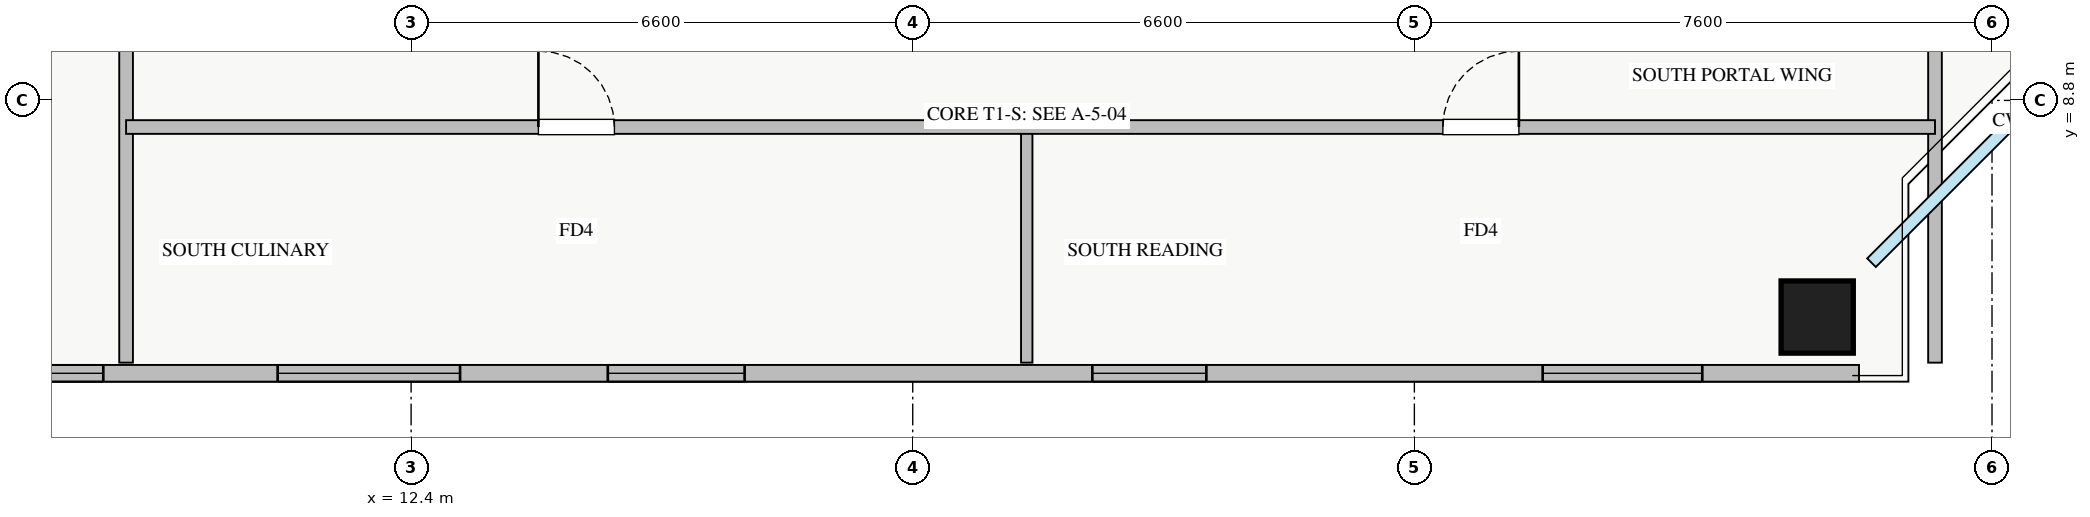
"""IFC4 building model, lengths in metres.
Left out: names, types, materials, properties, quantities, classifications, styles, units other than length and angle.
Written with IfcOpenShell. Run it as: python <this file> out.ifc"""

import sys

from ifc_helpers import new_model, si_unit, direction, frame, frame_2d, origin, origin_2d, place, context, subcontext, project, spatial, rectangle, extrude, source, transform, mapped, element, fill, save


model = new_model("IFC4")
c1 = context("Model", 3, precision=1e-05, world=origin(), true_north=direction((0.0, 1.0)))
c2 = subcontext(c1, "Body", "Model", "MODEL_VIEW")
j1 = project(units=[si_unit("LENGTHUNIT", "METRE"), si_unit("PLANEANGLEUNIT", "RADIAN")], contexts=[c1])
p1 = place(None, origin())
s1 = spatial("IfcSite", under=j1, at=p1, CompositionType="ELEMENT")
p2 = place(p1, origin())
s2 = spatial("IfcBuilding", under=s1, at=p2, CompositionType="ELEMENT")
p3 = place(p2, frame((0.0, 0.0, 163.25)))
s3 = spatial("IfcBuildingStorey", under=s2, at=p3, CompositionType="ELEMENT", Elevation=163.25)
m1 = source(origin(), c2, "Body", "SweptSolid", [
    extrude(rectangle(XDim=0.95, YDim=0.95, at=origin_2d()), origin(), (0.0, 0.0, 1.0), 3.25),
])
p4 = place(p3, frame((30.9, 5.95, 0.0), z_axis=(0.0, 0.0, 1.0), x_axis=(1.0, 0.0, 0.0)))
e1 = element("IfcColumn", 1, at=p4, inside=s3, PredefinedType="COLUMN", context=c2, shape_type="MappedRepresentation", body=[
    mapped(m1, transform((0.0, 0.0, 0.0), x_axis=(1.0, 0.0, 0.0), y_axis=(0.0, 1.0, 0.0), z_axis=(0.0, 0.0, 1.0), scale=1.0)),
])
p5 = place(p3, frame((6.55, 5.21, 0.0), z_axis=(0.0, 0.0, 1.0), x_axis=(1.0, 0.0, 0.0)))
e2 = element("IfcWall", 2, at=p5, inside=s3, PredefinedType="STANDARD", context=c2, shape_type="SweptSolid", body=[
    extrude(rectangle(XDim=24.9, YDim=0.22, at=frame_2d((12.45, 0.0))), origin(), (0.0, 0.0, 1.0), 2.61),
])
p6 = place(p5, frame((0.3, 0.0, 0.9)))
e3 = element("IfcOpeningElement", 3, at=p6, cuts=e2, PredefinedType="OPENING", context=c2, shape_type="SweptSolid", body=[
    extrude(rectangle(XDim=1.5, YDim=1.5, at=frame_2d((0.75, 0.75))), frame((0.0, 0.12, 0.0), z_axis=(0.0, -1.0, 0.0), x_axis=(1.0, 0.0, 0.0)), (0.0, 0.0, 1.0), 0.24),
])
p7 = place(p5, frame((8.438, 0.0, 0.9)))
e4 = element("IfcOpeningElement", 4, at=p7, cuts=e2, PredefinedType="OPENING", context=c2, shape_type="SweptSolid", body=[
    extrude(rectangle(XDim=1.8, YDim=1.45, at=frame_2d((0.9, 0.725))), frame((0.0, 0.12, 0.0), z_axis=(0.0, -1.0, 0.0), x_axis=(1.0, 0.0, 0.0)), (0.0, 0.0, 1.0), 0.24),
])
p8 = place(p5, frame((14.813, 0.0, 0.9)))
e5 = element("IfcOpeningElement", 5, at=p8, cuts=e2, PredefinedType="OPENING", context=c2, shape_type="SweptSolid", body=[
    extrude(rectangle(XDim=1.5, YDim=1.45, at=frame_2d((0.75, 0.725))), frame((0.0, 0.12, 0.0), z_axis=(0.0, -1.0, 0.0), x_axis=(1.0, 0.0, 0.0)), (0.0, 0.0, 1.0), 0.24),
])
p9 = place(p5, frame((20.738, 0.0, 0.9)))
e6 = element("IfcOpeningElement", 6, at=p9, cuts=e2, PredefinedType="OPENING", context=c2, shape_type="SweptSolid", body=[
    extrude(rectangle(XDim=2.1, YDim=1.48, at=frame_2d((1.05, 0.74))), frame((0.0, 0.12, 0.0), z_axis=(0.0, -1.0, 0.0), x_axis=(1.0, 0.0, 0.0)), (0.0, 0.0, 1.0), 0.24),
])
p10 = place(p5, frame((4.094, 0.0, 0.9)))
e7 = element("IfcOpeningElement", 7, at=p10, cuts=e2, PredefinedType="OPENING", context=c2, shape_type="SweptSolid", body=[
    extrude(rectangle(XDim=2.4, YDim=1.5, at=frame_2d((1.2, 0.75))), frame((0.0, 0.12, 0.0), z_axis=(0.0, -1.0, 0.0), x_axis=(1.0, 0.0, 0.0)), (0.0, 0.0, 1.0), 0.24),
])
p11 = place(p3, frame((8.65, 5.35, 0.0), z_axis=(0.0, 0.0, 1.0), x_axis=(0.0, 1.0, 0.0)))
e8 = element("IfcWall", 8, at=p11, inside=s3, PredefinedType="PARTITIONING", context=c2, shape_type="SweptSolid", body=[
    extrude(rectangle(XDim=11.35, YDim=0.18, at=frame_2d((5.675, 0.0))), origin(), (0.0, 0.0, 1.0), 3.07),
])
p12 = place(p11, frame((4.6, 0.0, 0.0)))
e9 = element("IfcOpeningElement", 9, at=p12, cuts=e8, PredefinedType="OPENING", context=c2, shape_type="SweptSolid", body=[
    extrude(rectangle(XDim=1.0, YDim=2.05, at=frame_2d((0.5, 1.025))), frame((0.0, 0.1, 0.0), z_axis=(0.0, -1.0, 0.0), x_axis=(1.0, 0.0, 0.0)), (0.0, 0.0, 1.0), 0.2),
])
p13 = place(p11, frame((8.8, 0.0, 0.0)))
e10 = element("IfcOpeningElement", 10, at=p13, cuts=e8, PredefinedType="OPENING", context=c2, shape_type="SweptSolid", body=[
    extrude(rectangle(XDim=1.0, YDim=2.05, at=frame_2d((0.5, 1.025))), frame((0.0, 0.1, 0.0), z_axis=(0.0, -1.0, 0.0), x_axis=(1.0, 0.0, 0.0)), (0.0, 0.0, 1.0), 0.2),
])
p14 = place(p3, frame((32.45, 5.35, 0.0), z_axis=(0.0, 0.0, 1.0), x_axis=(0.0, 1.0, 0.0)))
e11 = element("IfcWall", 11, at=p14, inside=s3, PredefinedType="PARTITIONING", context=c2, shape_type="SweptSolid", body=[
    extrude(rectangle(XDim=11.35, YDim=0.18, at=frame_2d((5.675, 0.0))), origin(), (0.0, 0.0, 1.0), 3.07),
])
p15 = place(p14, frame((4.6, 0.0, 0.0)))
e12 = element("IfcOpeningElement", 12, at=p15, cuts=e11, PredefinedType="OPENING", context=c2, shape_type="SweptSolid", body=[
    extrude(rectangle(XDim=1.0, YDim=2.05, at=frame_2d((0.5, 1.025))), frame((0.0, 0.1, 0.0), z_axis=(0.0, -1.0, 0.0), x_axis=(1.0, 0.0, 0.0)), (0.0, 0.0, 1.0), 0.2),
])
p16 = place(p14, frame((8.8, 0.0, 0.0)))
e13 = element("IfcOpeningElement", 13, at=p16, cuts=e11, PredefinedType="OPENING", context=c2, shape_type="SweptSolid", body=[
    extrude(rectangle(XDim=1.0, YDim=2.05, at=frame_2d((0.5, 1.025))), frame((0.0, 0.1, 0.0), z_axis=(0.0, -1.0, 0.0), x_axis=(1.0, 0.0, 0.0)), (0.0, 0.0, 1.0), 0.2),
])
p17 = place(p3, frame((20.5, 5.35, 0.0), z_axis=(0.0, 0.0, 1.0), x_axis=(0.0, 1.0, 0.0)))
e14 = element("IfcWall", 14, at=p17, inside=s3, PredefinedType="PARTITIONING", context=c2, shape_type="SweptSolid", body=[
    extrude(rectangle(XDim=3.1, YDim=0.15, at=frame_2d((1.55, 0.0))), origin(), (0.0, 0.0, 1.0), 3.07),
])
p18 = place(p3, frame((8.65, 8.45, 0.0), z_axis=(0.0, 0.0, 1.0), x_axis=(1.0, 0.0, 0.0)))
e15 = element("IfcWall", 15, at=p18, inside=s3, PredefinedType="PARTITIONING", context=c2, shape_type="SweptSolid", body=[
    extrude(rectangle(XDim=23.8, YDim=0.18, at=frame_2d((11.9, 0.0))), origin(), (0.0, 0.0, 1.0), 3.07),
])
p19 = place(p18, frame((5.425, 0.0, 0.0)))
e16 = element("IfcOpeningElement", 16, at=p19, cuts=e15, PredefinedType="OPENING", context=c2, shape_type="SweptSolid", body=[
    extrude(rectangle(XDim=1.0, YDim=2.05, at=frame_2d((0.5, 1.025))), frame((0.0, 0.1, 0.0), z_axis=(0.0, -1.0, 0.0), x_axis=(1.0, 0.0, 0.0)), (0.0, 0.0, 1.0), 0.2),
])
p20 = place(p18, frame((17.325, 0.0, 0.0)))
e17 = element("IfcOpeningElement", 17, at=p20, cuts=e15, PredefinedType="OPENING", context=c2, shape_type="SweptSolid", body=[
    extrude(rectangle(XDim=1.0, YDim=2.05, at=frame_2d((0.5, 1.025))), frame((0.0, 0.1, 0.0), z_axis=(0.0, -1.0, 0.0), x_axis=(1.0, 0.0, 0.0)), (0.0, 0.0, 1.0), 0.2),
])
m2 = source(origin(), c2, "Body", "SweptSolid", [
    extrude(rectangle(XDim=1.5, YDim=1.5, at=frame_2d((0.75, 0.75))), frame((0.0, 0.03, 0.0), z_axis=(0.0, -1.0, 0.0), x_axis=(1.0, 0.0, 0.0)), (0.0, 0.0, 1.0), 0.06),
])
p21 = place(p6, origin())
e18 = element("IfcWindow", 18, at=p21, inside=s3, PartitioningType="TRIPLE_PANEL_VERTICAL", PredefinedType="WINDOW", context=c2, shape_type="MappedRepresentation", body=[
    mapped(m2, transform((0.0, 0.0, 0.0), x_axis=(1.0, 0.0, 0.0), y_axis=(0.0, 1.0, 0.0), z_axis=(0.0, 0.0, 1.0), scale=1.0)),
])
fill(e3, e18)
m3 = source(origin(), c2, "Body", "SweptSolid", [
    extrude(rectangle(XDim=1.8, YDim=1.45, at=frame_2d((0.9, 0.725))), frame((0.0, 0.03, 0.0), z_axis=(0.0, -1.0, 0.0), x_axis=(1.0, 0.0, 0.0)), (0.0, 0.0, 1.0), 0.06),
])
p22 = place(p7, origin())
e19 = element("IfcWindow", 19, at=p22, inside=s3, PartitioningType="DOUBLE_PANEL_VERTICAL", PredefinedType="WINDOW", context=c2, shape_type="MappedRepresentation", body=[
    mapped(m3, transform((0.0, 0.0, 0.0), x_axis=(1.0, 0.0, 0.0), y_axis=(0.0, 1.0, 0.0), z_axis=(0.0, 0.0, 1.0), scale=1.0)),
])
fill(e4, e19)
m4 = source(origin(), c2, "Body", "SweptSolid", [
    extrude(rectangle(XDim=1.5, YDim=1.45, at=frame_2d((0.75, 0.725))), frame((0.0, 0.03, 0.0), z_axis=(0.0, -1.0, 0.0), x_axis=(1.0, 0.0, 0.0)), (0.0, 0.0, 1.0), 0.06),
])
p23 = place(p8, origin())
e20 = element("IfcWindow", 20, at=p23, inside=s3, PartitioningType="DOUBLE_PANEL_VERTICAL", PredefinedType="WINDOW", context=c2, shape_type="MappedRepresentation", body=[
    mapped(m4, transform((0.0, 0.0, 0.0), x_axis=(1.0, 0.0, 0.0), y_axis=(0.0, 1.0, 0.0), z_axis=(0.0, 0.0, 1.0), scale=1.0)),
])
fill(e5, e20)
m5 = source(origin(), c2, "Body", "SweptSolid", [
    extrude(rectangle(XDim=2.1, YDim=1.48, at=frame_2d((1.05, 0.74))), frame((0.0, 0.03, 0.0), z_axis=(0.0, -1.0, 0.0), x_axis=(1.0, 0.0, 0.0)), (0.0, 0.0, 1.0), 0.06),
])
p24 = place(p9, origin())
e21 = element("IfcWindow", 21, at=p24, inside=s3, PartitioningType="TRIPLE_PANEL_VERTICAL", PredefinedType="WINDOW", context=c2, shape_type="MappedRepresentation", body=[
    mapped(m5, transform((0.0, 0.0, 0.0), x_axis=(1.0, 0.0, 0.0), y_axis=(0.0, 1.0, 0.0), z_axis=(0.0, 0.0, 1.0), scale=1.0)),
])
fill(e6, e21)
m6 = source(origin(), c2, "Body", "SweptSolid", [
    extrude(rectangle(XDim=1.0, YDim=2.05, at=frame_2d((0.5, 1.025))), frame((0.0, 0.025, 0.0), z_axis=(0.0, -1.0, 0.0), x_axis=(1.0, 0.0, 0.0)), (0.0, 0.0, 1.0), 0.05),
])
p25 = place(p19, origin())
e22 = element("IfcDoor", 22, at=p25, inside=s3, OperationType="SINGLE_SWING_LEFT", PredefinedType="DOOR", context=c2, shape_type="MappedRepresentation", body=[
    mapped(m6, transform((0.0, 0.0, 0.0), x_axis=(1.0, 0.0, 0.0), y_axis=(0.0, 1.0, 0.0), z_axis=(0.0, 0.0, 1.0), scale=1.0)),
])
fill(e16, e22)
p26 = place(p20, origin())
e23 = element("IfcDoor", 23, at=p26, inside=s3, OperationType="SINGLE_SWING_RIGHT", PredefinedType="DOOR", context=c2, shape_type="MappedRepresentation", body=[
    mapped(m6, transform((0.0, 0.0, 0.0), x_axis=(1.0, 0.0, 0.0), y_axis=(0.0, 1.0, 0.0), z_axis=(0.0, 0.0, 1.0), scale=1.0)),
])
fill(e17, e23)
m7 = source(origin(), c2, "Body", "SweptSolid", [
    extrude(rectangle(XDim=2.4, YDim=1.5, at=frame_2d((1.2, 0.75))), frame((0.0, 0.03, 0.0), z_axis=(0.0, -1.0, 0.0), x_axis=(1.0, 0.0, 0.0)), (0.0, 0.0, 1.0), 0.06),
])
p27 = place(p10, origin())
e24 = element("IfcWindow", 24, at=p27, inside=s3, PartitioningType="TRIPLE_PANEL_VERTICAL", PredefinedType="WINDOW", context=c2, shape_type="MappedRepresentation", body=[
    mapped(m7, transform((0.0, 0.0, 0.0), x_axis=(1.0, 0.0, 0.0), y_axis=(0.0, 1.0, 0.0), z_axis=(0.0, 0.0, 1.0), scale=1.0)),
])
fill(e7, e24)
save(model, sys.argv[1])
